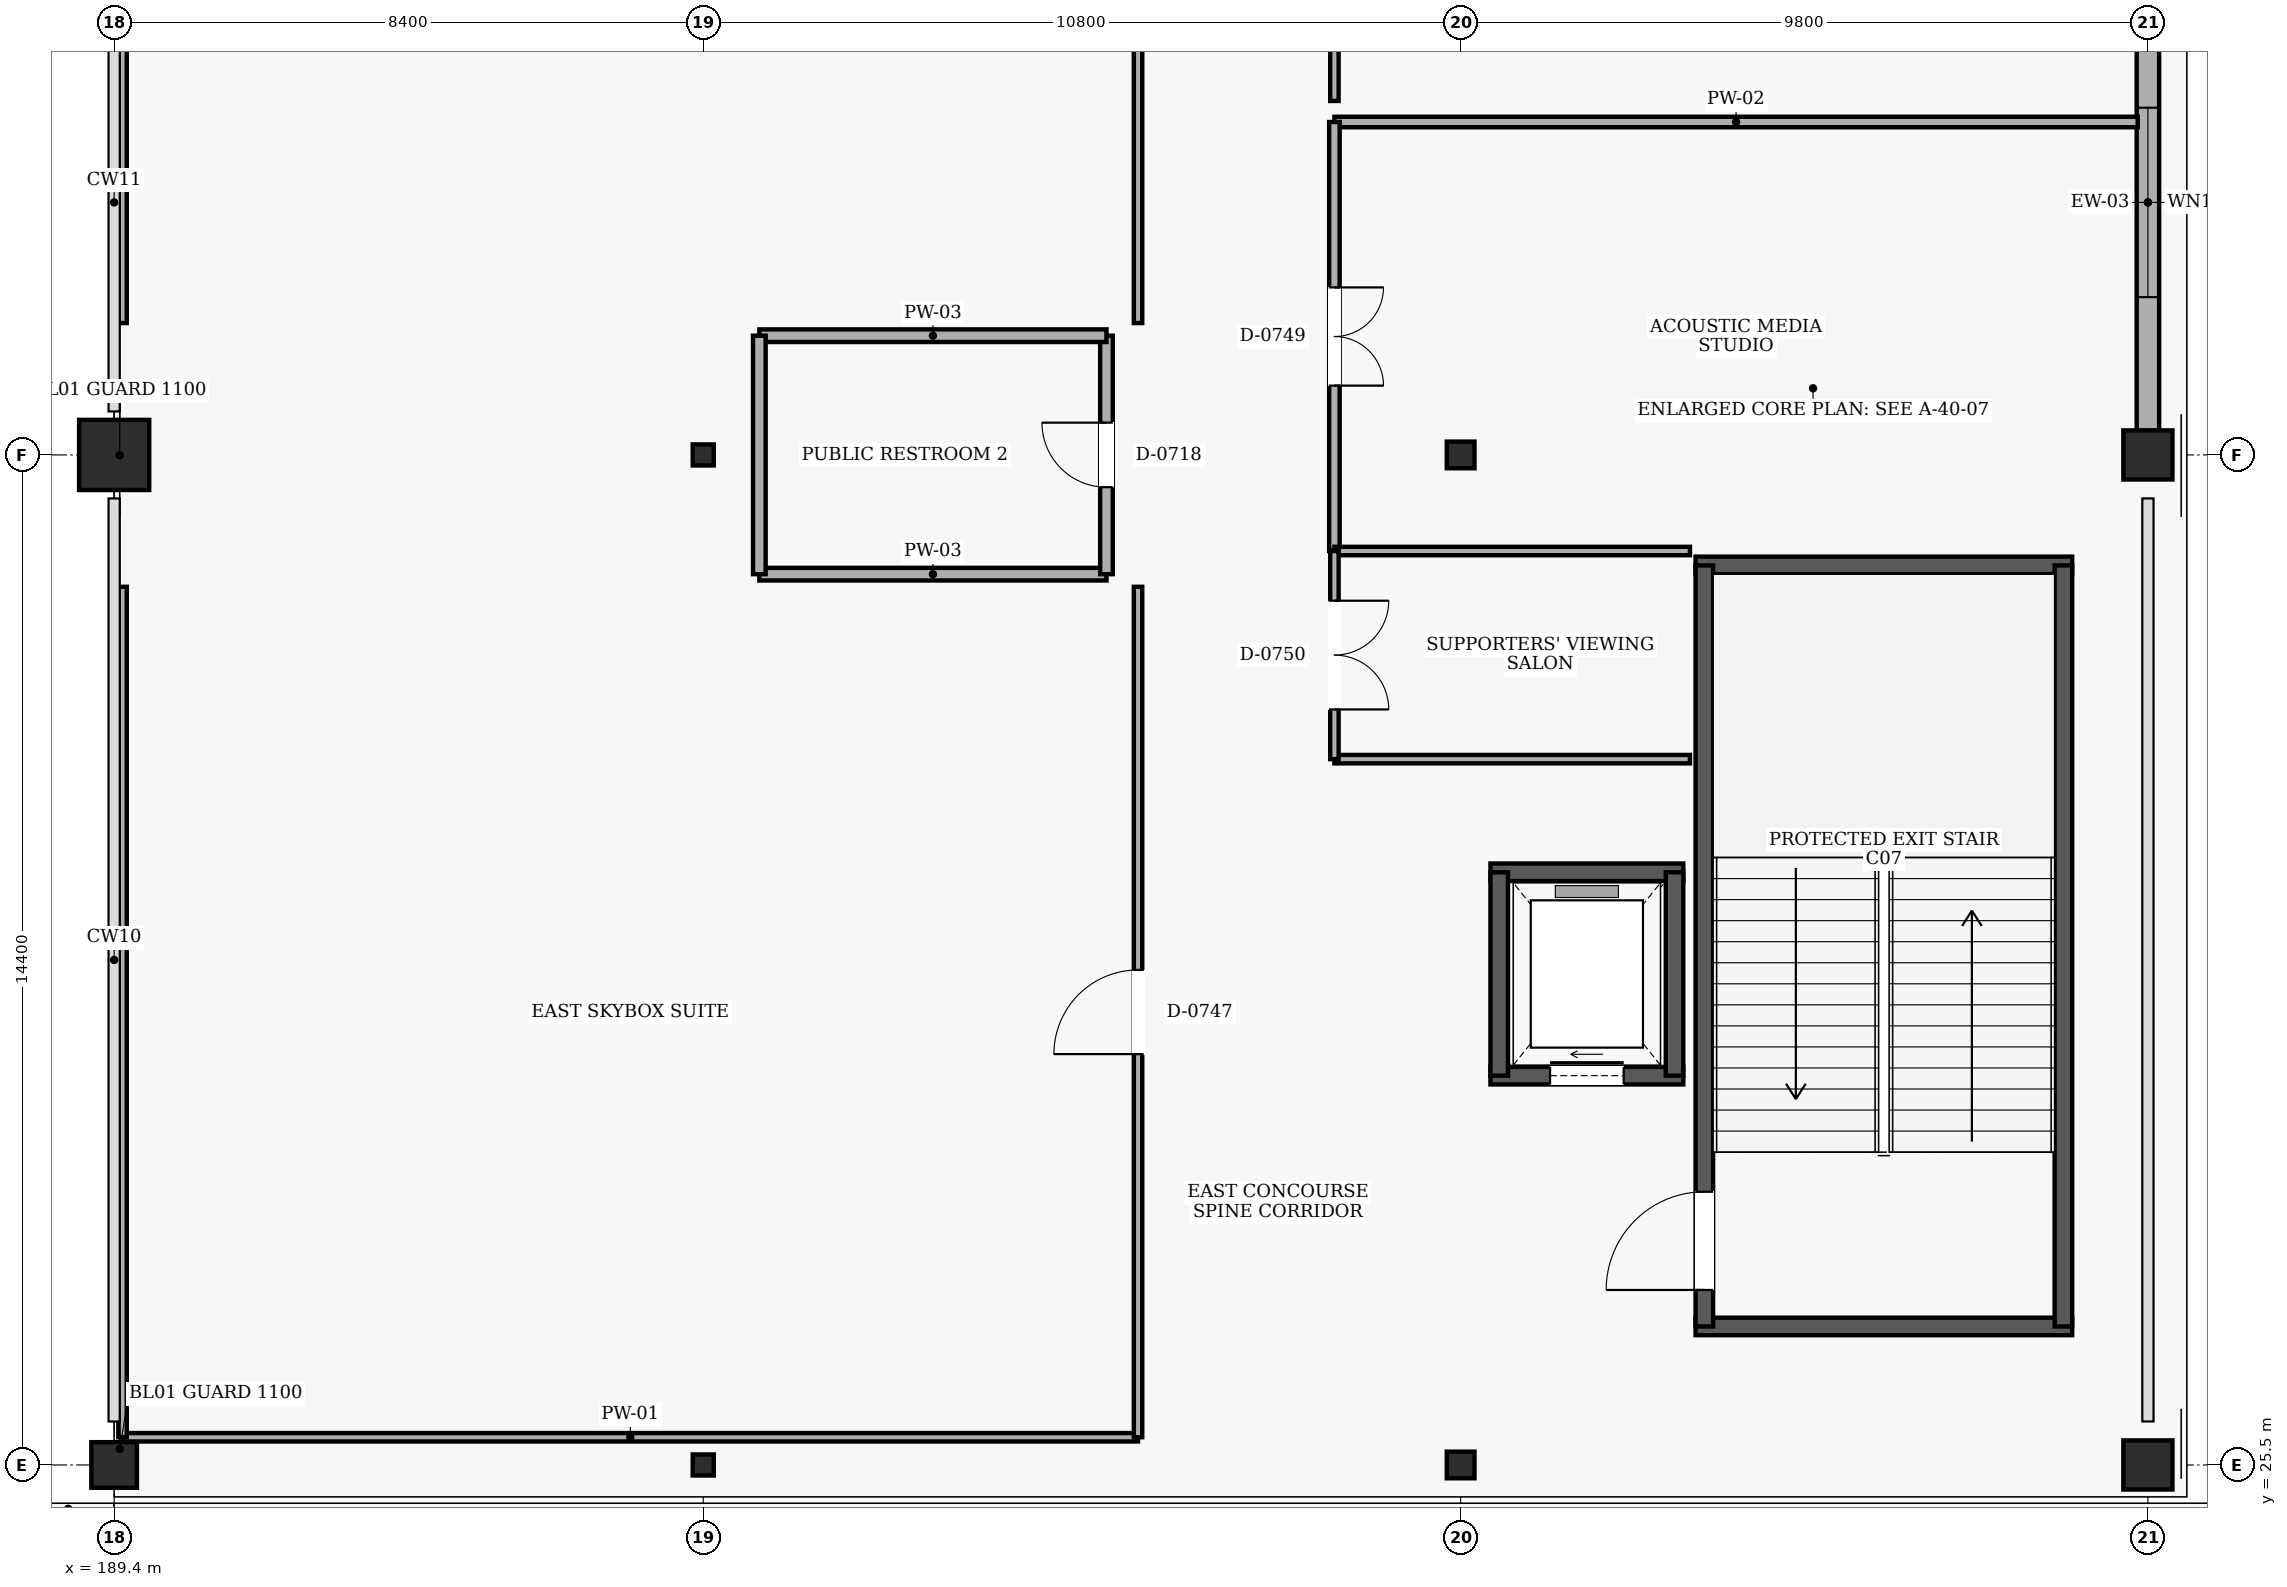
"""IFC4 building model, lengths in metres.
Left out: names, types, materials, properties, quantities, classifications, styles, units other than length and angle.
Written with IfcOpenShell. Run it as: python <this file> out.ifc"""

import sys

from ifc_helpers import new_model, si_unit, direction, frame, frame_2d, origin, origin_2d, place, context, subcontext, project, spatial, rectangle, hollow_rectangle, i_section, extrude, element, fill, save


model = new_model("IFC4")
c1 = context("Model", 3, precision=1e-05, world=origin(), true_north=direction((0.0, 1.0)))
c2 = subcontext(c1, "Body", "Model", "MODEL_VIEW")
j1 = project(units=[si_unit("LENGTHUNIT", "METRE"), si_unit("PLANEANGLEUNIT", "RADIAN")], contexts=[c1])
p1 = place(None, origin())
s1 = spatial("IfcSite", under=j1, at=p1, CompositionType="ELEMENT")
p2 = place(p1, origin())
s2 = spatial("IfcBuilding", under=s1, at=p2, CompositionType="ELEMENT")
p3 = place(p2, frame((0.0, 0.0, 19.8)))
s3 = spatial("IfcBuildingStorey", under=s2, at=p3, CompositionType="ELEMENT", Elevation=19.8)
p4 = place(p3, frame((189.4, 25.5, 0.0), z_axis=(0.0, 0.0, 1.0), x_axis=(1.0, 0.0, 0.0)))
e1 = element("IfcColumn", 1, at=p4, inside=s3, PredefinedType="COLUMN", context=c2, shape_type="SweptSolid", body=[
    extrude(rectangle(XDim=0.65, YDim=0.65, at=origin_2d()), origin(), (0.0, 0.0, 1.0), 4.8),
])
p5 = place(p3, frame((189.4, 39.9, 0.0), z_axis=(0.0, 0.0, 1.0), x_axis=(1.0, 0.0, 0.0)))
e2 = element("IfcColumn", 2, at=p5, inside=s3, PredefinedType="COLUMN", context=c2, shape_type="SweptSolid", body=[
    extrude(rectangle(XDim=1.0, YDim=1.0, at=origin_2d()), origin(), (0.0, 0.0, 1.0), 4.8),
])
for number, where, z_axis, x_axis in (
    (3, (197.8, 25.5, 0.0), (0.0, 0.0, 1.0), (1.0, 0.0, 0.0)),
    (4, (197.8, 39.9, 0.0), (0.0, 0.0, 1.0), (1.0, 0.0, 0.0)),
):
    element("IfcColumn", number, at=place(p3, frame(where, z_axis=z_axis, x_axis=x_axis)), inside=s3, PredefinedType="COLUMN", context=c2, shape_type="SweptSolid", body=[
        extrude(hollow_rectangle(XDim=0.3, YDim=0.3, WallThickness=0.016, at=origin_2d()), origin(), (0.0, 0.0, 1.0), 4.8),
    ])
for number, where, z_axis, x_axis in (
    (5, (208.6, 25.5, 0.0), (0.0, 0.0, 1.0), (1.0, 0.0, 0.0)),
    (6, (208.6, 39.9, 0.0), (0.0, 0.0, 1.0), (1.0, 0.0, 0.0)),
):
    element("IfcColumn", number, at=place(p3, frame(where, z_axis=z_axis, x_axis=x_axis)), inside=s3, PredefinedType="COLUMN", context=c2, shape_type="SweptSolid", body=[
        extrude(i_section(OverallWidth=0.395, OverallDepth=0.38, WebThickness=0.019, FlangeThickness=0.03, at=origin_2d()), origin(), (0.0, 0.0, 1.0), 4.8),
    ])
for number, where, z_axis, x_axis in (
    (7, (218.4, 25.5, 0.0), (0.0, 0.0, 1.0), (1.0, 0.0, 0.0)),
    (8, (218.4, 39.9, 0.0), (0.0, 0.0, 1.0), (1.0, 0.0, 0.0)),
):
    element("IfcColumn", number, at=place(p3, frame(where, z_axis=z_axis, x_axis=x_axis)), inside=s3, PredefinedType="COLUMN", context=c2, shape_type="SweptSolid", body=[
        extrude(rectangle(XDim=0.7, YDim=0.7, at=origin_2d()), origin(), (0.0, 0.0, 1.0), 4.8),
    ])
p6 = place(p3, frame((218.4, 46.755, 0.0), z_axis=(0.0, 0.0, 1.0), x_axis=(0.0, -1.0, 0.0)))
e9 = element("IfcWall", 9, at=p6, inside=s3, PredefinedType="SOLIDWALL", context=c2, shape_type="SweptSolid", body=[
    extrude(rectangle(XDim=6.51, YDim=0.32, at=frame_2d((3.255, 0.0))), origin(), (0.0, 0.0, 1.0), 3.88),
])
p7 = place(p6, frame((1.905, 0.0, 0.9)))
e10 = element("IfcOpeningElement", 10, at=p7, cuts=e9, PredefinedType="OPENING", context=c2, shape_type="SweptSolid", body=[
    extrude(rectangle(XDim=2.7, YDim=1.8, at=frame_2d((1.35, 0.9))), frame((0.0, 0.17, 0.0), z_axis=(0.0, -1.0, 0.0), x_axis=(1.0, 0.0, 0.0)), (0.0, 0.0, 1.0), 0.34),
])
for number, where, z_axis, x_axis in (
    (11, (211.95, 27.475, 0.0), (0.0, 0.0, 1.0), (1.0, 0.0, 0.0)),
    (12, (217.32, 38.325, 0.0), (0.0, 0.0, 1.0), (-1.0, 0.0, 0.0)),
):
    element("IfcWall", number, at=place(p3, frame(where, z_axis=z_axis, x_axis=x_axis)), inside=s3, PredefinedType="SHEAR", context=c2, shape_type="SweptSolid", body=[
        extrude(rectangle(XDim=5.37, YDim=0.25, at=frame_2d((2.685, 0.0))), origin(), (0.0, 0.0, 1.0), 4.5),
    ])
p8 = place(p3, frame((212.075, 27.475, 0.0), z_axis=(0.0, 0.0, 1.0), x_axis=(0.0, 1.0, 0.0)))
e13 = element("IfcWall", 13, at=p8, inside=s3, PredefinedType="SHEAR", context=c2, shape_type="SweptSolid", body=[
    extrude(rectangle(XDim=10.85, YDim=0.25, at=frame_2d((5.425, 0.0))), origin(), (0.0, 0.0, 1.0), 4.5),
])
p9 = place(p8, frame((0.52, 0.0, 0.0)))
e14 = element("IfcOpeningElement", 14, at=p9, cuts=e13, PredefinedType="OPENING", context=c2, shape_type="SweptSolid", body=[
    extrude(rectangle(XDim=1.4, YDim=2.15, at=frame_2d((0.7, 1.075))), frame((0.0, 0.135, 0.0), z_axis=(0.0, -1.0, 0.0), x_axis=(1.0, 0.0, 0.0)), (0.0, 0.0, 1.0), 0.27),
])
p10 = place(p3, frame((217.195, 27.475, 0.0), z_axis=(0.0, 0.0, 1.0), x_axis=(0.0, 1.0, 0.0)))
e15 = element("IfcWall", 15, at=p10, inside=s3, PredefinedType="SHEAR", context=c2, shape_type="SweptSolid", body=[
    extrude(rectangle(XDim=10.85, YDim=0.25, at=frame_2d((5.425, 0.0))), origin(), (0.0, 0.0, 1.0), 4.5),
])
p11 = place(p3, frame((209.025, 31.05, 0.0), z_axis=(0.0, 0.0, 1.0), x_axis=(1.0, 0.0, 0.0)))
e16 = element("IfcWall", 16, at=p11, inside=s3, PredefinedType="SHEAR", context=c2, shape_type="SweptSolid", body=[
    extrude(rectangle(XDim=2.75, YDim=0.25, at=frame_2d((1.375, 0.0))), origin(), (0.0, 0.0, 1.0), 4.5),
])
p12 = place(p11, frame((0.85, 0.0, 0.0)))
e17 = element("IfcOpeningElement", 17, at=p12, cuts=e16, PredefinedType="OPENING", context=c2, shape_type="SweptSolid", body=[
    extrude(rectangle(XDim=1.05, YDim=2.15, at=frame_2d((0.525, 1.075))), frame((0.0, 0.135, 0.0), z_axis=(0.0, -1.0, 0.0), x_axis=(1.0, 0.0, 0.0)), (0.0, 0.0, 1.0), 0.27),
])
p13 = place(p3, frame((211.775, 33.95, 0.0), z_axis=(0.0, 0.0, 1.0), x_axis=(-1.0, 0.0, 0.0)))
e18 = element("IfcWall", 18, at=p13, inside=s3, PredefinedType="SHEAR", context=c2, shape_type="SweptSolid", body=[
    extrude(rectangle(XDim=2.75, YDim=0.25, at=frame_2d((1.375, 0.0))), origin(), (0.0, 0.0, 1.0), 4.5),
])
for number, where, z_axis, x_axis in (
    (19, (209.15, 33.95, 0.0), (0.0, 0.0, 1.0), (0.0, -1.0, 0.0)),
    (20, (211.65, 31.05, 0.0), (0.0, 0.0, 1.0), (0.0, 1.0, 0.0)),
):
    element("IfcWall", number, at=place(p3, frame(where, z_axis=z_axis, x_axis=x_axis)), inside=s3, PredefinedType="SHEAR", context=c2, shape_type="SweptSolid", body=[
        extrude(rectangle(XDim=2.9, YDim=0.25, at=frame_2d((1.45, 0.0))), origin(), (0.0, 0.0, 1.0), 4.5),
    ])
p14 = place(p3, frame((198.6, 38.2, 0.0), z_axis=(0.0, 0.0, 1.0), x_axis=(1.0, 0.0, 0.0)))
e21 = element("IfcWall", 21, at=p14, inside=s3, PredefinedType="PARTITIONING", context=c2, shape_type="SweptSolid", body=[
    extrude(rectangle(XDim=4.95, YDim=0.18, at=frame_2d((2.475, 0.0))), origin(), (0.0, 0.0, 1.0), 4.5),
])
p15 = place(p3, frame((203.55, 38.2, 0.0), z_axis=(0.0, 0.0, 1.0), x_axis=(0.0, 1.0, 0.0)))
e22 = element("IfcWall", 22, at=p15, inside=s3, PredefinedType="PARTITIONING", context=c2, shape_type="SweptSolid", body=[
    extrude(rectangle(XDim=3.4, YDim=0.18, at=frame_2d((1.7, 0.0))), origin(), (0.0, 0.0, 1.0), 4.5),
])
p16 = place(p15, frame((1.24, 0.0, 0.0)))
e23 = element("IfcOpeningElement", 23, at=p16, cuts=e22, PredefinedType="OPENING", context=c2, shape_type="SweptSolid", body=[
    extrude(rectangle(XDim=0.92, YDim=2.1, at=frame_2d((0.46, 1.05))), frame((0.0, 0.1, 0.0), z_axis=(0.0, -1.0, 0.0), x_axis=(1.0, 0.0, 0.0)), (0.0, 0.0, 1.0), 0.2),
])
p17 = place(p3, frame((203.55, 41.6, 0.0), z_axis=(0.0, 0.0, 1.0), x_axis=(-1.0, 0.0, 0.0)))
e24 = element("IfcWall", 24, at=p17, inside=s3, PredefinedType="PARTITIONING", context=c2, shape_type="SweptSolid", body=[
    extrude(rectangle(XDim=4.95, YDim=0.18, at=frame_2d((2.475, 0.0))), origin(), (0.0, 0.0, 1.0), 4.5),
])
p18 = place(p3, frame((198.6, 41.6, 0.0), z_axis=(0.0, 0.0, 1.0), x_axis=(0.0, -1.0, 0.0)))
e25 = element("IfcWall", 25, at=p18, inside=s3, PredefinedType="PARTITIONING", context=c2, shape_type="SweptSolid", body=[
    extrude(rectangle(XDim=3.4, YDim=0.18, at=frame_2d((1.7, 0.0))), origin(), (0.0, 0.0, 1.0), 4.5),
])
p19 = place(p3, frame((189.52, 25.895, 0.0), z_axis=(0.0, 0.0, 1.0), x_axis=(1.0, 0.0, 0.0)))
e26 = element("IfcWall", 26, at=p19, inside=s3, PredefinedType="PARTITIONING", context=c2, shape_type="SweptSolid", body=[
    extrude(rectangle(XDim=14.48, YDim=0.12, at=frame_2d((7.24, 0.0))), origin(), (0.0, 0.0, 1.0), 3.58),
])
p20 = place(p3, frame((204.0, 25.895, 0.0), z_axis=(0.0, 0.0, 1.0), x_axis=(0.0, 1.0, 0.0)))
e27 = element("IfcWall", 27, at=p20, inside=s3, PredefinedType="PARTITIONING", context=c2, shape_type="SweptSolid", body=[
    extrude(rectangle(XDim=12.125, YDim=0.12, at=frame_2d((6.062, 0.0))), origin(), (0.0, 0.0, 1.0), 4.5),
])
p21 = place(p20, frame((5.462, 0.0, 0.0)))
e28 = element("IfcOpeningElement", 28, at=p21, cuts=e27, PredefinedType="OPENING", context=c2, shape_type="SweptSolid", body=[
    extrude(rectangle(XDim=1.2, YDim=2.15, at=frame_2d((0.6, 1.075))), frame((0.0, 0.07, 0.0), z_axis=(0.0, -1.0, 0.0), x_axis=(1.0, 0.0, 0.0)), (0.0, 0.0, 1.0), 0.14),
])
p22 = place(p3, frame((189.52, 38.02, 0.0), z_axis=(0.0, 0.0, 1.0), x_axis=(0.0, -1.0, 0.0)))
e29 = element("IfcWall", 29, at=p22, inside=s3, PredefinedType="PARTITIONING", context=c2, shape_type="SweptSolid", body=[
    extrude(rectangle(XDim=12.125, YDim=0.12, at=frame_2d((6.062, 0.0))), origin(), (0.0, 0.0, 1.0), 4.5),
])
p23 = place(p3, frame((204.0, 41.78, 0.0), z_axis=(0.0, 0.0, 1.0), x_axis=(0.0, 1.0, 0.0)))
e30 = element("IfcWall", 30, at=p23, inside=s3, PredefinedType="PARTITIONING", context=c2, shape_type="SweptSolid", body=[
    extrude(rectangle(XDim=10.74, YDim=0.12, at=frame_2d((5.37, 0.0))), origin(), (0.0, 0.0, 1.0), 4.5),
])
p24 = place(p23, frame((4.72, 0.0, 0.0)))
e31 = element("IfcOpeningElement", 31, at=p24, cuts=e30, PredefinedType="OPENING", context=c2, shape_type="SweptSolid", body=[
    extrude(rectangle(XDim=1.3, YDim=2.2, at=frame_2d((0.65, 1.1))), frame((0.0, 0.07, 0.0), z_axis=(0.0, -1.0, 0.0), x_axis=(1.0, 0.0, 0.0)), (0.0, 0.0, 1.0), 0.14),
])
p25 = place(p3, frame((189.52, 52.52, 0.0), z_axis=(0.0, 0.0, 1.0), x_axis=(0.0, -1.0, 0.0)))
e32 = element("IfcWall", 32, at=p25, inside=s3, PredefinedType="PARTITIONING", context=c2, shape_type="SweptSolid", body=[
    extrude(rectangle(XDim=10.74, YDim=0.12, at=frame_2d((5.37, 0.0))), origin(), (0.0, 0.0, 1.0), 4.5),
])
p26 = place(p3, frame((218.255, 44.646, 0.0), z_axis=(0.0, 0.0, 1.0), x_axis=(-1.0, 0.0, 0.0)))
e33 = element("IfcWall", 33, at=p26, inside=s3, PredefinedType="PARTITIONING", context=c2, shape_type="SweptSolid", body=[
    extrude(rectangle(XDim=11.455, YDim=0.15, at=frame_2d((5.728, 0.0))), origin(), (0.0, 0.0, 1.0), 4.5),
])
p27 = place(p3, frame((206.8, 44.646, 0.0), z_axis=(0.0, 0.0, 1.0), x_axis=(0.0, -1.0, 0.0)))
e34 = element("IfcWall", 34, at=p27, inside=s3, PredefinedType="PARTITIONING", context=c2, shape_type="SweptSolid", body=[
    extrude(rectangle(XDim=6.116, YDim=0.15, at=frame_2d((3.058, 0.0))), origin(), (0.0, 0.0, 1.0), 4.5),
])
p28 = place(p27, frame((2.358, 0.0, 0.0)))
e35 = element("IfcOpeningElement", 35, at=p28, cuts=e34, PredefinedType="OPENING", context=c2, shape_type="SweptSolid", body=[
    extrude(rectangle(XDim=1.4, YDim=2.2, at=frame_2d((0.7, 1.1))), frame((0.0, 0.085, 0.0), z_axis=(0.0, -1.0, 0.0), x_axis=(1.0, 0.0, 0.0)), (0.0, 0.0, 1.0), 0.17),
])
for number, where, z_axis, x_axis in (
    (36, (206.8, 35.563, 0.0), (0.0, 0.0, 1.0), (1.0, 0.0, 0.0)),
    (37, (211.87, 38.53, 0.0), (0.0, 0.0, 1.0), (-1.0, 0.0, 0.0)),
):
    element("IfcWall", number, at=place(p3, frame(where, z_axis=z_axis, x_axis=x_axis)), inside=s3, PredefinedType="PARTITIONING", context=c2, shape_type="SweptSolid", body=[
        extrude(rectangle(XDim=5.07, YDim=0.12, at=frame_2d((2.535, 0.0))), origin(), (0.0, 0.0, 1.0), 4.5),
    ])
p29 = place(p3, frame((206.8, 38.53, 0.0), z_axis=(0.0, 0.0, 1.0), x_axis=(0.0, -1.0, 0.0)))
e38 = element("IfcWall", 38, at=p29, inside=s3, PredefinedType="PARTITIONING", context=c2, shape_type="SweptSolid", body=[
    extrude(rectangle(XDim=2.967, YDim=0.12, at=frame_2d((1.483, 0.0))), origin(), (0.0, 0.0, 1.0), 4.5),
])
p30 = place(p29, frame((0.708, 0.0, 0.0)))
e39 = element("IfcOpeningElement", 39, at=p30, cuts=e38, PredefinedType="OPENING", context=c2, shape_type="SweptSolid", body=[
    extrude(rectangle(XDim=1.55, YDim=2.2, at=frame_2d((0.775, 1.1))), frame((0.0, 0.07, 0.0), z_axis=(0.0, -1.0, 0.0), x_axis=(1.0, 0.0, 0.0)), (0.0, 0.0, 1.0), 0.14),
])
p31 = place(p3, frame((206.8, 54.03, 0.0), z_axis=(0.0, 0.0, 1.0), x_axis=(0.0, -1.0, 0.0)))
e40 = element("IfcWall", 40, at=p31, inside=s3, PredefinedType="PARTITIONING", context=c2, shape_type="SweptSolid", body=[
    extrude(rectangle(XDim=9.083, YDim=0.12, at=frame_2d((4.542, 0.0))), origin(), (0.0, 0.0, 1.0), 4.5),
])
p32 = place(p31, frame((3.702, 0.0, 0.0)))
e41 = element("IfcOpeningElement", 41, at=p32, cuts=e40, PredefinedType="OPENING", context=c2, shape_type="SweptSolid", body=[
    extrude(rectangle(XDim=1.68, YDim=2.25, at=frame_2d((0.84, 1.125))), frame((0.0, 0.07, 0.0), z_axis=(0.0, -1.0, 0.0), x_axis=(1.0, 0.0, 0.0)), (0.0, 0.0, 1.0), 0.14),
])
p33 = place(p7, origin())
e42 = element("IfcWindow", 42, at=p33, inside=s3, PartitioningType="SINGLE_PANEL", PredefinedType="WINDOW", context=c2, shape_type="SweptSolid", body=[
    extrude(rectangle(XDim=2.7, YDim=1.8, at=frame_2d((1.35, 0.9))), frame((0.0, 0.03, 0.0), z_axis=(0.0, -1.0, 0.0), x_axis=(1.0, 0.0, 0.0)), (0.0, 0.0, 1.0), 0.06),
])
fill(e10, e42)
p34 = place(p9, frame((1.4, 0.0, 0.0), z_axis=(0.0, 0.0, 1.0), x_axis=(-1.0, 0.0, 0.0)))
e43 = element("IfcDoor", 43, at=p34, inside=s3, OperationType="SINGLE_SWING_RIGHT", PredefinedType="DOOR", context=c2, shape_type="SweptSolid", body=[
    extrude(rectangle(XDim=1.4, YDim=2.15, at=frame_2d((0.7, 1.075))), frame((0.0, 0.025, 0.0), z_axis=(0.0, -1.0, 0.0), x_axis=(1.0, 0.0, 0.0)), (0.0, 0.0, 1.0), 0.05),
])
fill(e14, e43)
p35 = place(p12, origin())
e44 = element("IfcDoor", 44, at=p35, inside=s3, OperationType="SLIDING_TO_RIGHT", PredefinedType="DOOR", context=c2, shape_type="SweptSolid", body=[
    extrude(rectangle(XDim=1.05, YDim=2.15, at=frame_2d((0.525, 1.075))), frame((0.0, 0.025, 0.0), z_axis=(0.0, -1.0, 0.0), x_axis=(1.0, 0.0, 0.0)), (0.0, 0.0, 1.0), 0.05),
])
fill(e17, e44)
p36 = place(p16, origin())
e45 = element("IfcDoor", 45, at=p36, inside=s3, OperationType="SINGLE_SWING_RIGHT", PredefinedType="DOOR", context=c2, shape_type="SweptSolid", body=[
    extrude(rectangle(XDim=0.92, YDim=2.1, at=frame_2d((0.46, 1.05))), frame((0.0, 0.025, 0.0), z_axis=(0.0, -1.0, 0.0), x_axis=(1.0, 0.0, 0.0)), (0.0, 0.0, 1.0), 0.05),
])
fill(e23, e45)
p37 = place(p21, origin())
e46 = element("IfcDoor", 46, at=p37, inside=s3, OperationType="SINGLE_SWING_LEFT", PredefinedType="DOOR", context=c2, shape_type="SweptSolid", body=[
    extrude(rectangle(XDim=1.2, YDim=2.15, at=frame_2d((0.6, 1.075))), frame((0.0, 0.025, 0.0), z_axis=(0.0, -1.0, 0.0), x_axis=(1.0, 0.0, 0.0)), (0.0, 0.0, 1.0), 0.05),
])
fill(e28, e46)
p38 = place(p28, origin())
e47 = element("IfcDoor", 47, at=p38, inside=s3, OperationType="DOUBLE_DOOR_SINGLE_SWING", PredefinedType="DOOR", context=c2, shape_type="SweptSolid", body=[
    extrude(rectangle(XDim=1.4, YDim=2.2, at=frame_2d((0.7, 1.1))), frame((0.0, 0.025, 0.0), z_axis=(0.0, -1.0, 0.0), x_axis=(1.0, 0.0, 0.0)), (0.0, 0.0, 1.0), 0.05),
])
fill(e35, e47)
p39 = place(p30, origin())
e48 = element("IfcDoor", 48, at=p39, inside=s3, OperationType="DOUBLE_DOOR_SINGLE_SWING", PredefinedType="DOOR", context=c2, shape_type="SweptSolid", body=[
    extrude(rectangle(XDim=1.55, YDim=2.2, at=frame_2d((0.775, 1.1))), frame((0.0, 0.025, 0.0), z_axis=(0.0, -1.0, 0.0), x_axis=(1.0, 0.0, 0.0)), (0.0, 0.0, 1.0), 0.05),
])
fill(e39, e48)
save(model, sys.argv[1])
